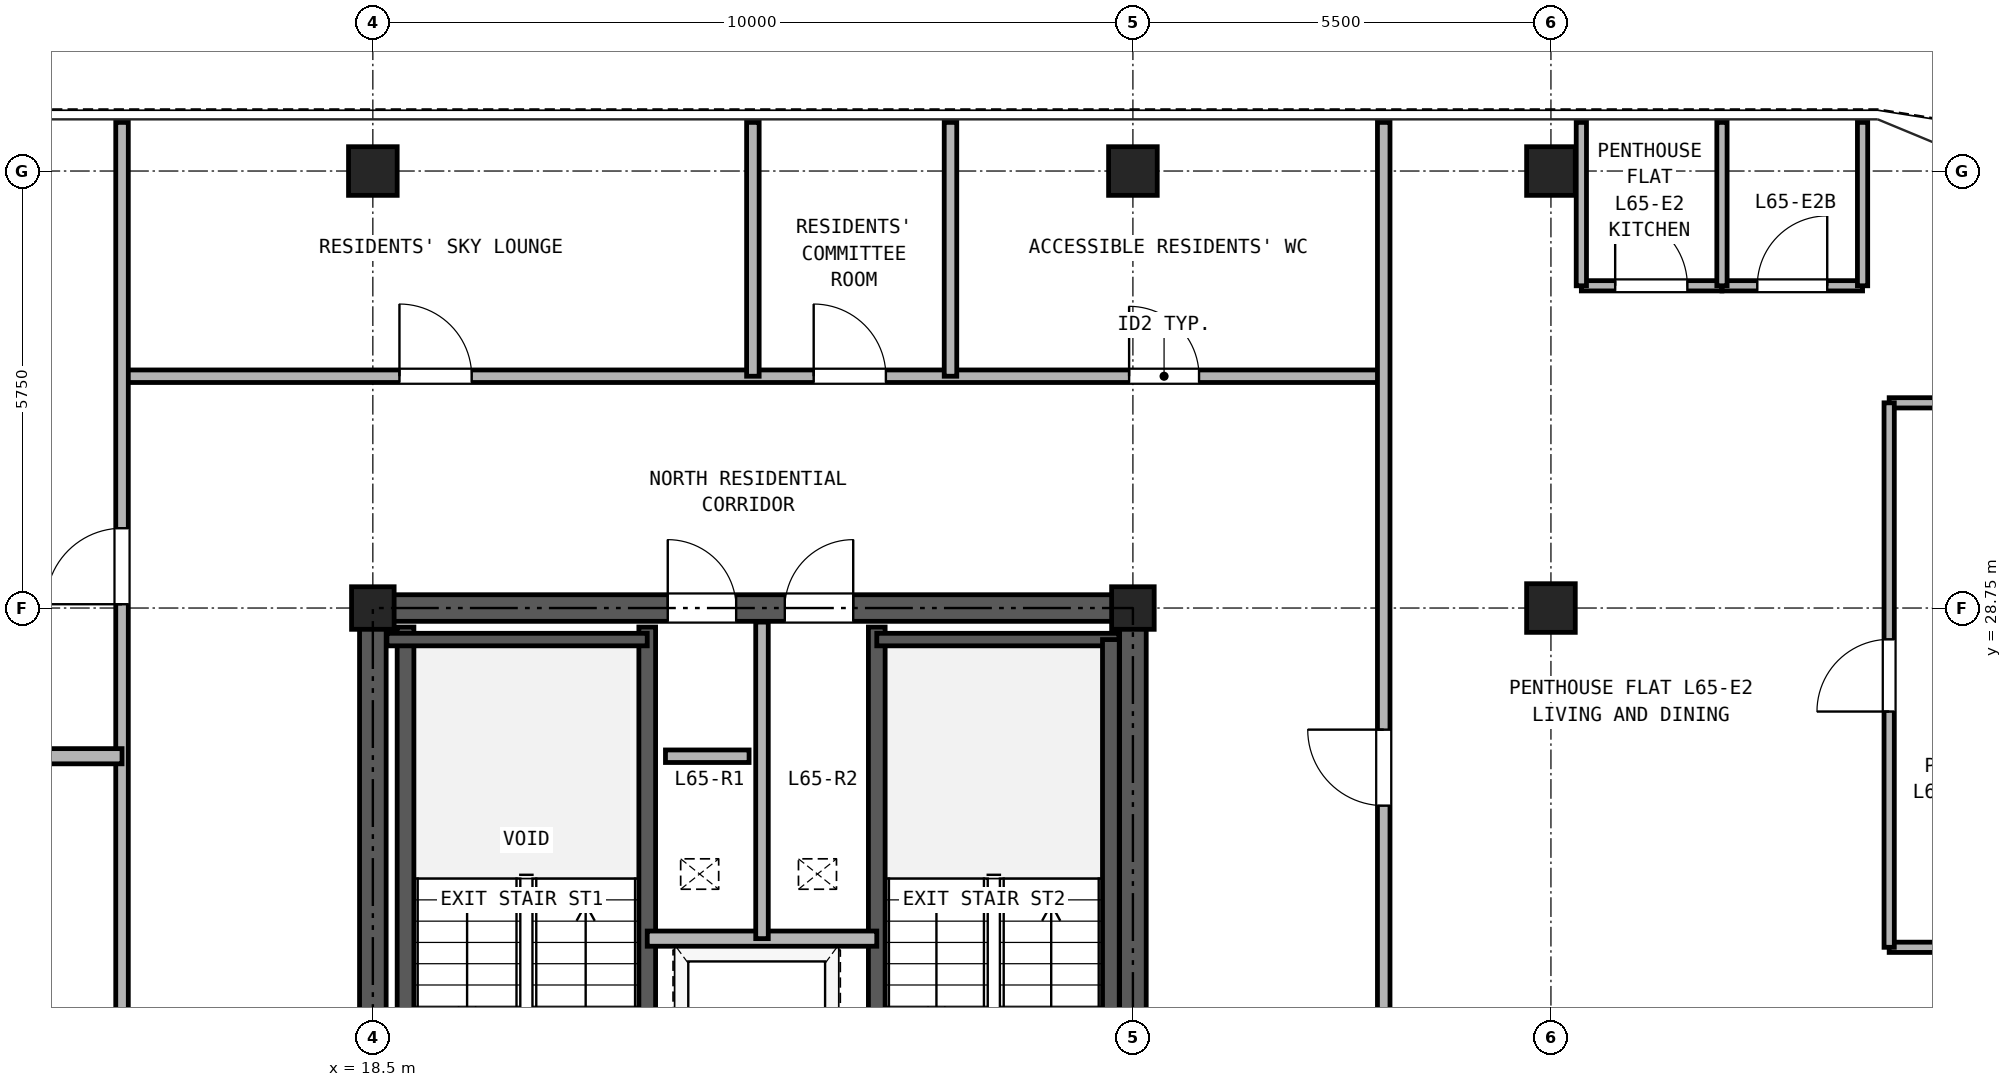
"""IFC4 building model, lengths in metres.
Left out: names, types, materials, properties, quantities, classifications, styles, units other than length and angle.
Written with IfcOpenShell. Run it as: python <this file> out.ifc"""

import sys

from ifc_helpers import new_model, si_unit, direction, frame, frame_2d, origin, origin_2d, place, context, subcontext, project, spatial, rectangle, hollow_rectangle, extrude, source, transform, mapped, element, fill, save


model = new_model("IFC4")
c1 = context("Model", 3, precision=1e-05, world=origin(), true_north=direction((0.0, 1.0)))
c2 = subcontext(c1, "Body", "Model", "MODEL_VIEW")
j1 = project(units=[si_unit("LENGTHUNIT", "METRE"), si_unit("PLANEANGLEUNIT", "RADIAN")], contexts=[c1])
p1 = place(None, origin())
s1 = spatial("IfcSite", under=j1, at=p1, CompositionType="ELEMENT")
p2 = place(p1, origin())
s2 = spatial("IfcBuilding", under=s1, at=p2, CompositionType="ELEMENT")
p3 = place(p2, frame((0.0, 0.0, 229.7)))
s3 = spatial("IfcBuildingStorey", under=s2, at=p3, CompositionType="ELEMENT", Elevation=229.7)
m1 = source(origin(), c2, "Body", "SweptSolid", [
    extrude(hollow_rectangle(XDim=0.64, YDim=0.64, WallThickness=0.035, at=origin_2d()), origin(), (0.0, 0.0, 1.0), 2.98),
])
for number, where, z_axis, x_axis in (
    (1, (18.5, 34.5, 0.0), (0.0, 0.0, 1.0), (1.0, 0.0, 0.0)),
    (2, (28.5, 34.5, 0.0), (0.0, 0.0, 1.0), (1.0, 0.0, 0.0)),
    (3, (34.0, 34.5, 0.0), (0.0, 0.0, 1.0), (1.0, 0.0, 0.0)),
):
    element("IfcColumn", number, at=place(p3, frame(where, z_axis=z_axis, x_axis=x_axis)), inside=s3, PredefinedType="COLUMN", context=c2, shape_type="MappedRepresentation", body=[
        mapped(m1, transform((0.0, 0.0, 0.0), x_axis=(1.0, 0.0, 0.0), y_axis=(0.0, 1.0, 0.0), z_axis=(0.0, 0.0, 1.0), scale=1.0)),
    ])
m2 = source(origin(), c2, "Body", "SweptSolid", [
    extrude(hollow_rectangle(XDim=0.56, YDim=0.56, WallThickness=0.03, at=origin_2d()), origin(), (0.0, 0.0, 1.0), 2.98),
])
for number, where, z_axis, x_axis in (
    (4, (18.5, 28.75, 0.0), (0.0, 0.0, 1.0), (1.0, 0.0, 0.0)),
    (5, (28.5, 28.75, 0.0), (0.0, 0.0, 1.0), (1.0, 0.0, 0.0)),
):
    element("IfcColumn", number, at=place(p3, frame(where, z_axis=z_axis, x_axis=x_axis)), inside=s3, PredefinedType="COLUMN", context=c2, shape_type="MappedRepresentation", body=[
        mapped(m2, transform((0.0, 0.0, 0.0), x_axis=(1.0, 0.0, 0.0), y_axis=(0.0, 1.0, 0.0), z_axis=(0.0, 0.0, 1.0), scale=1.0)),
    ])
p4 = place(p3, frame((34.0, 28.75, 0.0), z_axis=(0.0, 0.0, 1.0), x_axis=(1.0, 0.0, 0.0)))
e6 = element("IfcColumn", 6, at=p4, inside=s3, PredefinedType="COLUMN", context=c2, shape_type="MappedRepresentation", body=[
    mapped(m1, transform((0.0, 0.0, 0.0), x_axis=(1.0, 0.0, 0.0), y_axis=(0.0, 1.0, 0.0), z_axis=(0.0, 0.0, 1.0), scale=1.0)),
])
p5 = place(p3, frame((18.325, 28.75, 0.0), z_axis=(0.0, 0.0, 1.0), x_axis=(1.0, 0.0, 0.0)))
e7 = element("IfcWall", 7, at=p5, inside=s3, PredefinedType="SHEAR", context=c2, shape_type="SweptSolid", body=[
    extrude(rectangle(XDim=10.35, YDim=0.35, at=frame_2d((5.175, 0.0))), origin(), (0.0, 0.0, 1.0), 2.98),
])
p6 = place(p5, frame((4.055, 0.0, 0.0)))
e8 = element("IfcOpeningElement", 8, at=p6, cuts=e7, PredefinedType="OPENING", context=c2, shape_type="SweptSolid", body=[
    extrude(rectangle(XDim=0.9, YDim=2.05, at=frame_2d((0.45, 1.025))), frame((0.0, 0.185, 0.0), z_axis=(0.0, -1.0, 0.0), x_axis=(1.0, 0.0, 0.0)), (0.0, 0.0, 1.0), 0.37),
])
p7 = place(p5, frame((5.595, 0.0, 0.0)))
e9 = element("IfcOpeningElement", 9, at=p7, cuts=e7, PredefinedType="OPENING", context=c2, shape_type="SweptSolid", body=[
    extrude(rectangle(XDim=0.9, YDim=2.05, at=frame_2d((0.45, 1.025))), frame((0.0, 0.185, 0.0), z_axis=(0.0, -1.0, 0.0), x_axis=(1.0, 0.0, 0.0)), (0.0, 0.0, 1.0), 0.37),
])
p8 = place(p3, frame((18.5, 11.675, 0.0), z_axis=(0.0, 0.0, 1.0), x_axis=(0.0, 1.0, 0.0)))
e10 = element("IfcWall", 10, at=p8, inside=s3, PredefinedType="SHEAR", context=c2, shape_type="SweptSolid", body=[
    extrude(rectangle(XDim=16.9, YDim=0.35, at=frame_2d((8.45, 0.0))), origin(), (0.0, 0.0, 1.0), 2.98),
])
p9 = place(p8, frame((7.475, 0.0, 0.0)))
e11 = element("IfcOpeningElement", 11, at=p9, cuts=e10, PredefinedType="OPENING", context=c2, shape_type="SweptSolid", body=[
    extrude(rectangle(XDim=1.15, YDim=2.2, at=frame_2d((0.575, 1.1))), frame((0.0, 0.185, 0.0), z_axis=(0.0, -1.0, 0.0), x_axis=(1.0, 0.0, 0.0)), (0.0, 0.0, 1.0), 0.37),
])
p10 = place(p3, frame((28.5, 11.675, 0.0), z_axis=(0.0, 0.0, 1.0), x_axis=(0.0, 1.0, 0.0)))
e12 = element("IfcWall", 12, at=p10, inside=s3, PredefinedType="SHEAR", context=c2, shape_type="SweptSolid", body=[
    extrude(rectangle(XDim=16.9, YDim=0.35, at=frame_2d((8.45, 0.0))), origin(), (0.0, 0.0, 1.0), 2.98),
])
p11 = place(p10, frame((7.475, 0.0, 0.0)))
e13 = element("IfcOpeningElement", 13, at=p11, cuts=e12, PredefinedType="OPENING", context=c2, shape_type="SweptSolid", body=[
    extrude(rectangle(XDim=1.15, YDim=2.2, at=frame_2d((0.575, 1.1))), frame((0.0, 0.185, 0.0), z_axis=(0.0, -1.0, 0.0), x_axis=(1.0, 0.0, 0.0)), (0.0, 0.0, 1.0), 0.37),
])
for number, where, z_axis, x_axis in (
    (14, (18.93, 21.39, 0.0), (0.0, 0.0, 1.0), (0.0, 1.0, 0.0)),
    (15, (22.11, 21.39, 0.0), (0.0, 0.0, 1.0), (0.0, 1.0, 0.0)),
    (16, (25.13, 21.39, 0.0), (0.0, 0.0, 1.0), (0.0, 1.0, 0.0)),
):
    element("IfcWall", number, at=place(p3, frame(where, z_axis=z_axis, x_axis=x_axis)), inside=s3, PredefinedType="SOLIDWALL", context=c2, shape_type="SweptSolid", body=[
        extrude(rectangle(XDim=7.11, YDim=0.22, at=frame_2d((3.555, 0.0))), origin(), (0.0, 0.0, 1.0), 2.98),
    ])
p12 = place(p3, frame((18.685, 28.335, 0.0), z_axis=(0.0, 0.0, 1.0), x_axis=(1.0, 0.0, 0.0)))
e17 = element("IfcWall", 17, at=p12, inside=s3, PredefinedType="PARTITIONING", context=c2, shape_type="SweptSolid", body=[
    extrude(rectangle(XDim=3.425, YDim=0.165, at=frame_2d((1.712, 0.0))), origin(), (0.0, 0.0, 1.0), 2.98),
])
p13 = place(p3, frame((25.13, 28.335, 0.0), z_axis=(0.0, 0.0, 1.0), x_axis=(1.0, 0.0, 0.0)))
e18 = element("IfcWall", 18, at=p13, inside=s3, PredefinedType="PARTITIONING", context=c2, shape_type="SweptSolid", body=[
    extrude(rectangle(XDim=3.185, YDim=0.165, at=frame_2d((1.593, 0.0))), origin(), (0.0, 0.0, 1.0), 2.98),
])
p14 = place(p3, frame((28.21, 21.39, 0.0), z_axis=(0.0, 0.0, 1.0), x_axis=(0.0, 1.0, 0.0)))
e19 = element("IfcWall", 19, at=p14, inside=s3, PredefinedType="SOLIDWALL", context=c2, shape_type="SweptSolid", body=[
    extrude(rectangle(XDim=6.945, YDim=0.22, at=frame_2d((3.473, 0.0))), origin(), (0.0, 0.0, 1.0), 2.98),
])
p15 = place(p3, frame((22.11, 24.4, 0.0), z_axis=(0.0, 0.0, 1.0), x_axis=(1.0, 0.0, 0.0)))
e20 = element("IfcWall", 20, at=p15, inside=s3, PredefinedType="PARTITIONING", context=c2, shape_type="SweptSolid", body=[
    extrude(rectangle(XDim=3.02, YDim=0.2, at=frame_2d((1.51, 0.0))), origin(), (0.0, 0.0, 1.0), 2.98),
])
p16 = place(p3, frame((23.62, 24.4, 0.0), z_axis=(0.0, 0.0, 1.0), x_axis=(0.0, 1.0, 0.0)))
e21 = element("IfcWall", 21, at=p16, inside=s3, PredefinedType="PARTITIONING", context=c2, shape_type="SweptSolid", body=[
    extrude(rectangle(XDim=4.165, YDim=0.165, at=frame_2d((2.083, 0.0))), origin(), (0.0, 0.0, 1.0), 2.98),
])
p17 = place(p3, frame((15.2, 31.8, 0.0), z_axis=(0.0, 0.0, 1.0), x_axis=(1.0, 0.0, 0.0)))
e22 = element("IfcWall", 22, at=p17, inside=s3, PredefinedType="PARTITIONING", context=c2, shape_type="SweptSolid", body=[
    extrude(rectangle(XDim=16.6, YDim=0.165, at=frame_2d((8.3, 0.0))), origin(), (0.0, 0.0, 1.0), 2.655),
])
p18 = place(p17, frame((3.65, 0.0, 0.0)))
e23 = element("IfcOpeningElement", 23, at=p18, cuts=e22, PredefinedType="OPENING", context=c2, shape_type="SweptSolid", body=[
    extrude(rectangle(XDim=0.95, YDim=2.15, at=frame_2d((0.475, 1.075))), frame((0.0, 0.093, 0.0), z_axis=(0.0, -1.0, 0.0), x_axis=(1.0, 0.0, 0.0)), (0.0, 0.0, 1.0), 0.185),
])
p19 = place(p17, frame((9.1, 0.0, 0.0)))
e24 = element("IfcOpeningElement", 24, at=p19, cuts=e22, PredefinedType="OPENING", context=c2, shape_type="SweptSolid", body=[
    extrude(rectangle(XDim=0.95, YDim=2.15, at=frame_2d((0.475, 1.075))), frame((0.0, 0.093, 0.0), z_axis=(0.0, -1.0, 0.0), x_axis=(1.0, 0.0, 0.0)), (0.0, 0.0, 1.0), 0.185),
])
p20 = place(p17, frame((13.25, 0.0, 0.0)))
e25 = element("IfcOpeningElement", 25, at=p20, cuts=e22, PredefinedType="OPENING", context=c2, shape_type="SweptSolid", body=[
    extrude(rectangle(XDim=0.92, YDim=2.1, at=frame_2d((0.46, 1.05))), frame((0.0, 0.093, 0.0), z_axis=(0.0, -1.0, 0.0), x_axis=(1.0, 0.0, 0.0)), (0.0, 0.0, 1.0), 0.185),
])
p21 = place(p3, frame((15.2, 10.65, 0.0), z_axis=(0.0, 0.0, 1.0), x_axis=(0.0, 1.0, 0.0)))
e26 = element("IfcWall", 26, at=p21, inside=s3, PredefinedType="PARTITIONING", context=c2, shape_type="SweptSolid", body=[
    extrude(rectangle(XDim=24.49, YDim=0.165, at=frame_2d((12.245, 0.0))), origin(), (0.0, 0.0, 1.0), 2.98),
])
p22 = place(p21, frame((3.425, 0.0, 0.0)))
e27 = element("IfcOpeningElement", 27, at=p22, cuts=e26, PredefinedType="OPENING", context=c2, shape_type="SweptSolid", body=[
    extrude(rectangle(XDim=1.0, YDim=2.15, at=frame_2d((0.5, 1.075))), frame((0.0, 0.093, 0.0), z_axis=(0.0, -1.0, 0.0), x_axis=(1.0, 0.0, 0.0)), (0.0, 0.0, 1.0), 0.185),
])
p23 = place(p21, frame((11.5, 0.0, 0.0)))
e28 = element("IfcOpeningElement", 28, at=p23, cuts=e26, PredefinedType="OPENING", context=c2, shape_type="SweptSolid", body=[
    extrude(rectangle(XDim=1.0, YDim=2.15, at=frame_2d((0.5, 1.075))), frame((0.0, 0.093, 0.0), z_axis=(0.0, -1.0, 0.0), x_axis=(1.0, 0.0, 0.0)), (0.0, 0.0, 1.0), 0.185),
])
p24 = place(p21, frame((18.15, 0.0, 0.0)))
e29 = element("IfcOpeningElement", 29, at=p24, cuts=e26, PredefinedType="OPENING", context=c2, shape_type="SweptSolid", body=[
    extrude(rectangle(XDim=1.0, YDim=2.15, at=frame_2d((0.5, 1.075))), frame((0.0, 0.093, 0.0), z_axis=(0.0, -1.0, 0.0), x_axis=(1.0, 0.0, 0.0)), (0.0, 0.0, 1.0), 0.185),
])
p25 = place(p3, frame((31.8, 10.65, 0.0), z_axis=(0.0, 0.0, 1.0), x_axis=(0.0, 1.0, 0.0)))
e30 = element("IfcWall", 30, at=p25, inside=s3, PredefinedType="PARTITIONING", context=c2, shape_type="SweptSolid", body=[
    extrude(rectangle(XDim=24.49, YDim=0.165, at=frame_2d((12.245, 0.0))), origin(), (0.0, 0.0, 1.0), 2.98),
])
p26 = place(p25, frame((4.925, 0.0, 0.0)))
e31 = element("IfcOpeningElement", 31, at=p26, cuts=e30, PredefinedType="OPENING", context=c2, shape_type="SweptSolid", body=[
    extrude(rectangle(XDim=1.0, YDim=2.15, at=frame_2d((0.5, 1.075))), frame((0.0, 0.093, 0.0), z_axis=(0.0, -1.0, 0.0), x_axis=(1.0, 0.0, 0.0)), (0.0, 0.0, 1.0), 0.185),
])
p27 = place(p25, frame((15.5, 0.0, 0.0)))
e32 = element("IfcOpeningElement", 32, at=p27, cuts=e30, PredefinedType="OPENING", context=c2, shape_type="SweptSolid", body=[
    extrude(rectangle(XDim=1.0, YDim=2.15, at=frame_2d((0.5, 1.075))), frame((0.0, 0.093, 0.0), z_axis=(0.0, -1.0, 0.0), x_axis=(1.0, 0.0, 0.0)), (0.0, 0.0, 1.0), 0.185),
])
p28 = place(p3, frame((5.36, 26.8, 0.0), z_axis=(0.0, 0.0, 1.0), x_axis=(1.0, 0.0, 0.0)))
e33 = element("IfcWall", 33, at=p28, inside=s3, PredefinedType="PARTITIONING", context=c2, shape_type="SweptSolid", body=[
    extrude(rectangle(XDim=9.84, YDim=0.2, at=frame_2d((4.92, 0.0))), origin(), (0.0, 0.0, 1.0), 2.98),
])
p29 = place(p3, frame((34.4, 32.99, 0.0), z_axis=(0.0, 0.0, 1.0), x_axis=(1.0, 0.0, 0.0)))
e34 = element("IfcWall", 34, at=p29, inside=s3, PredefinedType="PARTITIONING", context=c2, shape_type="SweptSolid", body=[
    extrude(rectangle(XDim=1.85, YDim=0.135, at=frame_2d((0.925, 0.0))), origin(), (0.0, 0.0, 1.0), 2.98),
])
p30 = place(p29, frame((0.445, 0.0, 0.0)))
e35 = element("IfcOpeningElement", 35, at=p30, cuts=e34, PredefinedType="OPENING", context=c2, shape_type="SweptSolid", body=[
    extrude(rectangle(XDim=0.95, YDim=2.15, at=frame_2d((0.475, 1.075))), frame((0.0, 0.077, 0.0), z_axis=(0.0, -1.0, 0.0), x_axis=(1.0, 0.0, 0.0)), (0.0, 0.0, 1.0), 0.155),
])
p31 = place(p3, frame((36.25, 32.99, 0.0), z_axis=(0.0, 0.0, 1.0), x_axis=(1.0, 0.0, 0.0)))
e36 = element("IfcWall", 36, at=p31, inside=s3, PredefinedType="PARTITIONING", context=c2, shape_type="SweptSolid", body=[
    extrude(rectangle(XDim=1.85, YDim=0.135, at=frame_2d((0.925, 0.0))), origin(), (0.0, 0.0, 1.0), 2.98),
])
p32 = place(p31, frame((0.465, 0.0, 0.0)))
e37 = element("IfcOpeningElement", 37, at=p32, cuts=e36, PredefinedType="OPENING", context=c2, shape_type="SweptSolid", body=[
    extrude(rectangle(XDim=0.92, YDim=2.1, at=frame_2d((0.46, 1.05))), frame((0.0, 0.077, 0.0), z_axis=(0.0, -1.0, 0.0), x_axis=(1.0, 0.0, 0.0)), (0.0, 0.0, 1.0), 0.155),
])
for number, where, z_axis, x_axis in (
    (38, (34.4, 32.99, 0.0), (0.0, 0.0, 1.0), (0.0, 1.0, 0.0)),
    (39, (36.25, 32.99, 0.0), (0.0, 0.0, 1.0), (0.0, 1.0, 0.0)),
    (40, (38.1, 32.99, 0.0), (0.0, 0.0, 1.0), (0.0, 1.0, 0.0)),
):
    element("IfcWall", number, at=place(p3, frame(where, z_axis=z_axis, x_axis=x_axis)), inside=s3, PredefinedType="PARTITIONING", context=c2, shape_type="SweptSolid", body=[
        extrude(rectangle(XDim=2.15, YDim=0.135, at=frame_2d((1.075, 0.0))), origin(), (0.0, 0.0, 1.0), 2.98),
    ])
for number, where, z_axis, x_axis in (
    (41, (38.45, 24.286, 0.0), (0.0, 0.0, 1.0), (1.0, 0.0, 0.0)),
    (42, (38.45, 31.45, 0.0), (0.0, 0.0, 1.0), (1.0, 0.0, 0.0)),
):
    element("IfcWall", number, at=place(p3, frame(where, z_axis=z_axis, x_axis=x_axis)), inside=s3, PredefinedType="PARTITIONING", context=c2, shape_type="SweptSolid", body=[
        extrude(rectangle(XDim=3.19, YDim=0.135, at=frame_2d((1.595, 0.0))), origin(), (0.0, 0.0, 1.0), 2.98),
    ])
p33 = place(p3, frame((38.45, 24.286, 0.0), z_axis=(0.0, 0.0, 1.0), x_axis=(0.0, 1.0, 0.0)))
e43 = element("IfcWall", 43, at=p33, inside=s3, PredefinedType="PARTITIONING", context=c2, shape_type="SweptSolid", body=[
    extrude(rectangle(XDim=7.164, YDim=0.135, at=frame_2d((3.582, 0.0))), origin(), (0.0, 0.0, 1.0), 2.98),
])
p34 = place(p33, frame((3.102, 0.0, 0.0)))
e44 = element("IfcOpeningElement", 44, at=p34, cuts=e43, PredefinedType="OPENING", context=c2, shape_type="SweptSolid", body=[
    extrude(rectangle(XDim=0.95, YDim=2.15, at=frame_2d((0.475, 1.075))), frame((0.0, 0.077, 0.0), z_axis=(0.0, -1.0, 0.0), x_axis=(1.0, 0.0, 0.0)), (0.0, 0.0, 1.0), 0.155),
])
for number, where, z_axis, x_axis in (
    (45, (23.5, 31.8, 0.0), (0.0, 0.0, 1.0), (0.0, 1.0, 0.0)),
    (46, (26.1, 31.8, 0.0), (0.0, 0.0, 1.0), (0.0, 1.0, 0.0)),
):
    element("IfcWall", number, at=place(p3, frame(where, z_axis=z_axis, x_axis=x_axis)), inside=s3, PredefinedType="PARTITIONING", context=c2, shape_type="SweptSolid", body=[
        extrude(rectangle(XDim=3.34, YDim=0.165, at=frame_2d((1.67, 0.0))), origin(), (0.0, 0.0, 1.0), 2.98),
    ])
p35 = place(p3, frame((22.35, 26.8, 0.0), z_axis=(0.0, 0.0, 1.0), x_axis=(1.0, 0.0, 0.0)))
e47 = element("IfcWall", 47, at=p35, inside=s3, PredefinedType="PARTITIONING", context=c2, shape_type="SweptSolid", body=[
    extrude(rectangle(XDim=1.1, YDim=0.165, at=frame_2d((0.55, 0.0))), origin(), (0.0, 0.0, 1.0), 2.98),
])
p36 = place(p6, origin())
e48 = element("IfcDoor", 48, at=p36, inside=s3, OperationType="SINGLE_SWING_LEFT", PredefinedType="DOOR", context=c2, shape_type="SweptSolid", body=[
    extrude(rectangle(XDim=0.9, YDim=2.05, at=frame_2d((0.45, 1.025))), frame((0.0, 0.025, 0.0), z_axis=(0.0, -1.0, 0.0), x_axis=(1.0, 0.0, 0.0)), (0.0, 0.0, 1.0), 0.05),
])
fill(e8, e48)
p37 = place(p7, origin())
e49 = element("IfcDoor", 49, at=p37, inside=s3, OperationType="SINGLE_SWING_RIGHT", PredefinedType="DOOR", context=c2, shape_type="SweptSolid", body=[
    extrude(rectangle(XDim=0.9, YDim=2.05, at=frame_2d((0.45, 1.025))), frame((0.0, 0.025, 0.0), z_axis=(0.0, -1.0, 0.0), x_axis=(1.0, 0.0, 0.0)), (0.0, 0.0, 1.0), 0.05),
])
fill(e9, e49)
p38 = place(p24, origin())
e50 = element("IfcDoor", 50, at=p38, inside=s3, OperationType="SINGLE_SWING_LEFT", PredefinedType="DOOR", context=c2, shape_type="SweptSolid", body=[
    extrude(rectangle(XDim=1.0, YDim=2.15, at=frame_2d((0.5, 1.075))), frame((0.0, 0.025, 0.0), z_axis=(0.0, -1.0, 0.0), x_axis=(1.0, 0.0, 0.0)), (0.0, 0.0, 1.0), 0.05),
])
fill(e29, e50)
p39 = place(p30, frame((0.95, 0.0, 0.0), z_axis=(0.0, 0.0, 1.0), x_axis=(-1.0, 0.0, 0.0)))
e51 = element("IfcDoor", 51, at=p39, inside=s3, OperationType="SINGLE_SWING_LEFT", PredefinedType="DOOR", context=c2, shape_type="SweptSolid", body=[
    extrude(rectangle(XDim=0.95, YDim=2.15, at=frame_2d((0.475, 1.075))), frame((0.0, 0.025, 0.0), z_axis=(0.0, -1.0, 0.0), x_axis=(1.0, 0.0, 0.0)), (0.0, 0.0, 1.0), 0.05),
])
fill(e35, e51)
p40 = place(p32, frame((0.92, 0.0, 0.0), z_axis=(0.0, 0.0, 1.0), x_axis=(-1.0, 0.0, 0.0)))
e52 = element("IfcDoor", 52, at=p40, inside=s3, OperationType="SINGLE_SWING_RIGHT", PredefinedType="DOOR", context=c2, shape_type="SweptSolid", body=[
    extrude(rectangle(XDim=0.92, YDim=2.1, at=frame_2d((0.46, 1.05))), frame((0.0, 0.025, 0.0), z_axis=(0.0, -1.0, 0.0), x_axis=(1.0, 0.0, 0.0)), (0.0, 0.0, 1.0), 0.05),
])
fill(e37, e52)
p41 = place(p34, frame((0.95, 0.0, 0.0), z_axis=(0.0, 0.0, 1.0), x_axis=(-1.0, 0.0, 0.0)))
e53 = element("IfcDoor", 53, at=p41, inside=s3, OperationType="SINGLE_SWING_LEFT", PredefinedType="DOOR", context=c2, shape_type="SweptSolid", body=[
    extrude(rectangle(XDim=0.95, YDim=2.15, at=frame_2d((0.475, 1.075))), frame((0.0, 0.025, 0.0), z_axis=(0.0, -1.0, 0.0), x_axis=(1.0, 0.0, 0.0)), (0.0, 0.0, 1.0), 0.05),
])
fill(e44, e53)
p42 = place(p27, frame((1.0, 0.0, 0.0), z_axis=(0.0, 0.0, 1.0), x_axis=(-1.0, 0.0, 0.0)))
e54 = element("IfcDoor", 54, at=p42, inside=s3, OperationType="SINGLE_SWING_RIGHT", PredefinedType="DOOR", context=c2, shape_type="SweptSolid", body=[
    extrude(rectangle(XDim=1.0, YDim=2.15, at=frame_2d((0.5, 1.075))), frame((0.0, 0.025, 0.0), z_axis=(0.0, -1.0, 0.0), x_axis=(1.0, 0.0, 0.0)), (0.0, 0.0, 1.0), 0.05),
])
fill(e32, e54)
p43 = place(p18, origin())
e55 = element("IfcDoor", 55, at=p43, inside=s3, OperationType="SINGLE_SWING_LEFT", PredefinedType="DOOR", context=c2, shape_type="SweptSolid", body=[
    extrude(rectangle(XDim=0.95, YDim=2.15, at=frame_2d((0.475, 1.075))), frame((0.0, 0.025, 0.0), z_axis=(0.0, -1.0, 0.0), x_axis=(1.0, 0.0, 0.0)), (0.0, 0.0, 1.0), 0.05),
])
fill(e23, e55)
p44 = place(p19, origin())
e56 = element("IfcDoor", 56, at=p44, inside=s3, OperationType="SINGLE_SWING_LEFT", PredefinedType="DOOR", context=c2, shape_type="SweptSolid", body=[
    extrude(rectangle(XDim=0.95, YDim=2.15, at=frame_2d((0.475, 1.075))), frame((0.0, 0.025, 0.0), z_axis=(0.0, -1.0, 0.0), x_axis=(1.0, 0.0, 0.0)), (0.0, 0.0, 1.0), 0.05),
])
fill(e24, e56)
p45 = place(p20, origin())
e57 = element("IfcDoor", 57, at=p45, inside=s3, OperationType="SINGLE_SWING_LEFT", PredefinedType="DOOR", context=c2, shape_type="SweptSolid", body=[
    extrude(rectangle(XDim=0.92, YDim=2.1, at=frame_2d((0.46, 1.05))), frame((0.0, 0.025, 0.0), z_axis=(0.0, -1.0, 0.0), x_axis=(1.0, 0.0, 0.0)), (0.0, 0.0, 1.0), 0.05),
])
fill(e25, e57)
save(model, sys.argv[1])
